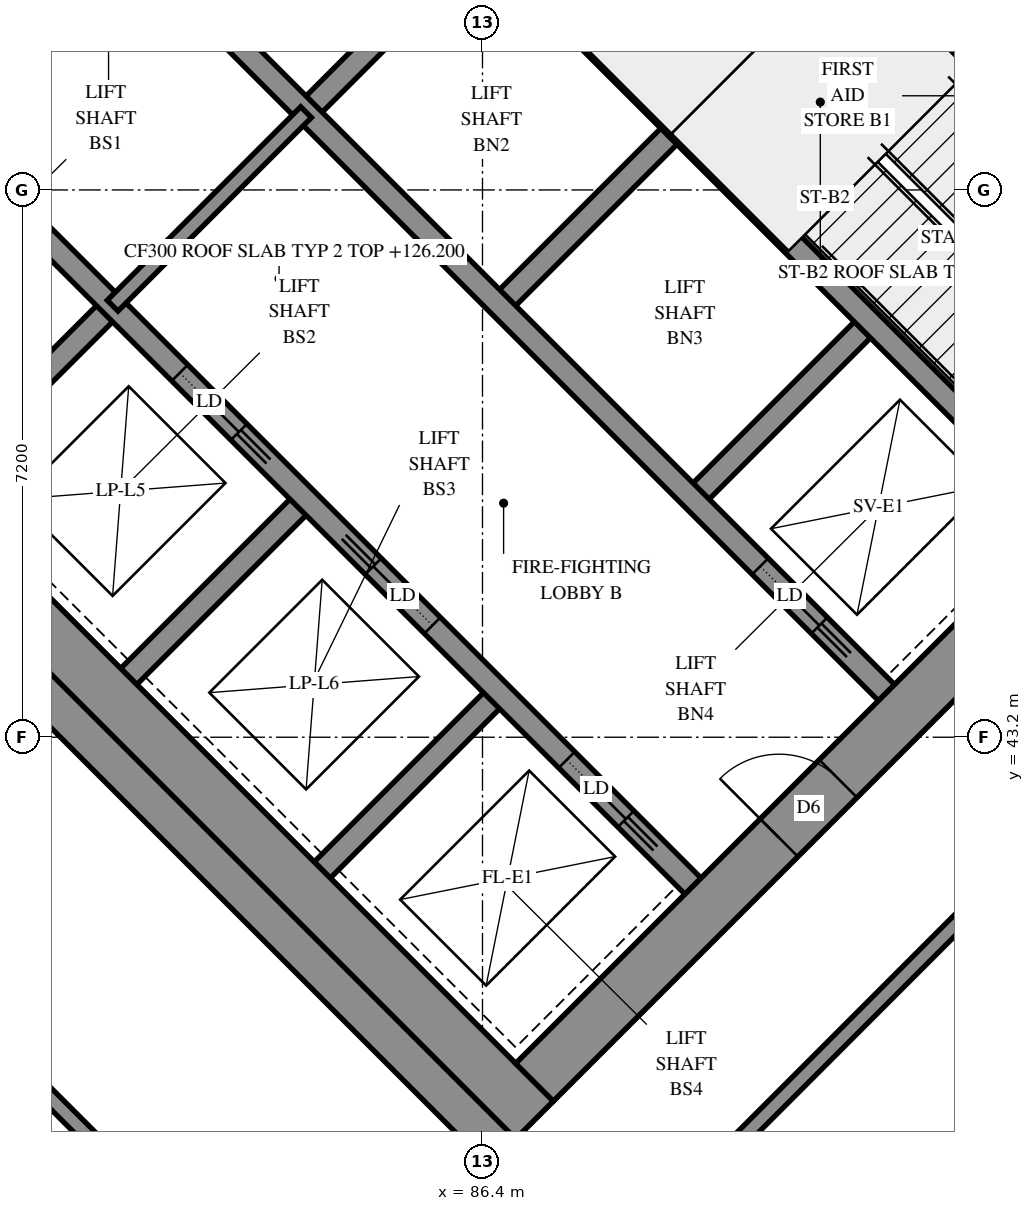
"""IFC4 building model, lengths in metres.
Left out: names, types, materials, properties, quantities, classifications, styles, units other than length and angle.
Written with IfcOpenShell. Run it as: python <this file> out.ifc"""

import sys

from ifc_helpers import new_model, si_unit, direction, frame, frame_2d, origin, place, context, subcontext, project, spatial, polyline, rectangle, outline, extrude, element, fill, save


model = new_model("IFC4")
c1 = context("Model", 3, precision=1e-05, world=origin(), true_north=direction((0.0, 1.0)))
c2 = subcontext(c1, "Body", "Model", "MODEL_VIEW")
j1 = project(units=[si_unit("LENGTHUNIT", "METRE"), si_unit("PLANEANGLEUNIT", "RADIAN")], contexts=[c1])
p1 = place(None, origin())
s1 = spatial("IfcSite", under=j1, at=p1, CompositionType="ELEMENT")
p2 = place(p1, origin())
s2 = spatial("IfcBuilding", under=s1, at=p2, CompositionType="ELEMENT")
p3 = place(p2, frame((0.0, 0.0, 126.2)))
s3 = spatial("IfcBuildingStorey", under=s2, at=p3, CompositionType="ELEMENT", Elevation=126.2)
p4 = place(p3, frame((75.912, 49.337, -0.3), z_axis=(0.0, 0.0, 1.0), x_axis=(0.7071036166, -0.7071099457, 0.0)))
e1 = element("IfcWall", 1, at=p4, inside=s3, PredefinedType="SHEAR", context=c2, shape_type="SweptSolid", body=[
    extrude(rectangle(XDim=15.8, YDim=0.7, at=frame_2d((7.9, 0.0))), origin(), (0.0, 0.0, 1.0), 4.3),
])
p5 = place(p3, frame((86.589, 60.014, -0.3), z_axis=(0.0, 0.0, 1.0), x_axis=(0.7071099457, -0.7071036166, 0.0)))
e2 = element("IfcWall", 2, at=p5, inside=s3, PredefinedType="SHEAR", context=c2, shape_type="SweptSolid", body=[
    extrude(rectangle(XDim=15.8, YDim=0.7, at=frame_2d((7.9, 0.0))), origin(), (0.0, 0.0, 1.0), 4.3),
])
p6 = place(p5, frame((10.7, 0.0, 0.3)))
e3 = element("IfcOpeningElement", 3, at=p6, cuts=e2, PredefinedType="OPENING", context=c2, shape_type="SweptSolid", body=[
    extrude(rectangle(XDim=0.8, YDim=2.1, at=frame_2d((0.4, 1.05))), frame((0.0, 0.36, 0.0), z_axis=(0.0, -1.0, 0.0), x_axis=(1.0, 0.0, 0.0)), (0.0, 0.0, 1.0), 0.72),
])
p7 = place(p3, frame((76.407, 49.337, -0.3), z_axis=(0.0, 0.0, 1.0), x_axis=(0.7071067812, 0.7071067812, 0.0)))
e4 = element("IfcWall", 4, at=p7, inside=s3, PredefinedType="SHEAR", context=c2, shape_type="SweptSolid", body=[
    extrude(rectangle(XDim=14.4, YDim=0.7, at=frame_2d((7.2, 0.0))), origin(), (0.0, 0.0, 1.0), 4.3),
])
p8 = place(p7, frame((4.55, 0.0, 0.3)))
e5 = element("IfcOpeningElement", 5, at=p8, cuts=e4, PredefinedType="OPENING", context=c2, shape_type="SweptSolid", body=[
    extrude(rectangle(XDim=1.1, YDim=2.1, at=frame_2d((0.55, 1.05))), frame((0.0, 0.36, 0.0), z_axis=(0.0, -1.0, 0.0), x_axis=(1.0, 0.0, 0.0)), (0.0, 0.0, 1.0), 0.72),
])
p9 = place(p7, frame((11.35, 0.0, 0.3)))
e6 = element("IfcOpeningElement", 6, at=p9, cuts=e4, PredefinedType="OPENING", context=c2, shape_type="SweptSolid", body=[
    extrude(rectangle(XDim=1.1, YDim=2.1, at=frame_2d((0.55, 1.05))), frame((0.0, 0.36, 0.0), z_axis=(0.0, -1.0, 0.0), x_axis=(1.0, 0.0, 0.0)), (0.0, 0.0, 1.0), 0.72),
])
p10 = place(p3, frame((87.084, 38.66, -0.3), z_axis=(0.0, 0.0, 1.0), x_axis=(0.7071067812, 0.7071067812, 0.0)))
e7 = element("IfcWall", 7, at=p10, inside=s3, PredefinedType="SHEAR", context=c2, shape_type="SweptSolid", body=[
    extrude(rectangle(XDim=14.4, YDim=0.7, at=frame_2d((7.2, 0.0))), origin(), (0.0, 0.0, 1.0), 4.3),
])
p11 = place(p10, frame((4.55, 0.0, 0.3)))
e8 = element("IfcOpeningElement", 8, at=p11, cuts=e7, PredefinedType="OPENING", context=c2, shape_type="SweptSolid", body=[
    extrude(rectangle(XDim=1.1, YDim=2.1, at=frame_2d((0.55, 1.05))), frame((0.0, 0.36, 0.0), z_axis=(0.0, -1.0, 0.0), x_axis=(1.0, 0.0, 0.0)), (0.0, 0.0, 1.0), 0.72),
])
p12 = place(p10, frame((11.35, 0.0, 0.3)))
e9 = element("IfcOpeningElement", 9, at=p12, cuts=e7, PredefinedType="OPENING", context=c2, shape_type="SweptSolid", body=[
    extrude(rectangle(XDim=1.1, YDim=2.1, at=frame_2d((0.55, 1.05))), frame((0.0, 0.36, 0.0), z_axis=(0.0, -1.0, 0.0), x_axis=(1.0, 0.0, 0.0)), (0.0, 0.0, 1.0), 0.72),
])
for number, where, z_axis, x_axis in (
    (10, (79.2, 46.544, 0.0), (0.0, 0.0, 1.0), (0.707, 0.707, 0.0)),
    (11, (84.079, 51.423, 0.0), (0.0, 0.0, 1.0), (0.707, 0.707, 0.0)),
):
    element("IfcWall", number, at=place(p3, frame(where, z_axis=z_axis, x_axis=x_axis)), inside=s3, PredefinedType="SOLIDWALL", context=c2, shape_type="SweptSolid", body=[
        extrude(rectangle(XDim=3.3, YDim=0.3, at=frame_2d((1.65, 0.0))), origin(), (0.0, 0.0, 1.0), 4.7),
    ])
p13 = place(p3, frame((81.746, 43.999, 0.0), z_axis=(0.0, 0.0, 1.0), x_axis=(0.7071067812, 0.7071067812, 0.0)))
e12 = element("IfcWall", 12, at=p13, inside=s3, PredefinedType="SOLIDWALL", context=c2, shape_type="SweptSolid", body=[
    extrude(rectangle(XDim=3.3, YDim=0.3, at=frame_2d((1.65, 0.0))), origin(), (0.0, 0.0, 1.0), 4.7),
])
p14 = place(p3, frame((86.625, 48.878, 0.0), z_axis=(0.0, 0.0, 1.0), x_axis=(0.7071067812, 0.7071067812, 0.0)))
e13 = element("IfcWall", 13, at=p14, inside=s3, PredefinedType="SOLIDWALL", context=c2, shape_type="SweptSolid", body=[
    extrude(rectangle(XDim=3.3, YDim=0.3, at=frame_2d((1.65, 0.0))), origin(), (0.0, 0.0, 1.0), 4.7),
])
p15 = place(p3, frame((84.291, 41.453, 0.0), z_axis=(0.0, 0.0, 1.0), x_axis=(0.7071067812, 0.7071067812, 0.0)))
e14 = element("IfcWall", 14, at=p15, inside=s3, PredefinedType="SOLIDWALL", context=c2, shape_type="SweptSolid", body=[
    extrude(rectangle(XDim=3.3, YDim=0.3, at=frame_2d((1.65, 0.0))), origin(), (0.0, 0.0, 1.0), 4.7),
])
p16 = place(p3, frame((89.17, 46.332, 0.0), z_axis=(0.0, 0.0, 1.0), x_axis=(0.7071067812, 0.7071067812, 0.0)))
e15 = element("IfcWall", 15, at=p16, inside=s3, PredefinedType="SOLIDWALL", context=c2, shape_type="SweptSolid", body=[
    extrude(rectangle(XDim=3.3, YDim=0.3, at=frame_2d((1.65, 0.0))), origin(), (0.0, 0.0, 1.0), 4.7),
])
p17 = place(p3, frame((78.988, 51.423, 0.0), z_axis=(0.0, 0.0, 1.0), x_axis=(0.7071067812, -0.7071067812, 0.0)))
e16 = element("IfcWall", 16, at=p17, inside=s3, PredefinedType="SOLIDWALL", context=c2, shape_type="SweptSolid", body=[
    extrude(rectangle(XDim=14.4, YDim=0.3, at=frame_2d((7.2, 0.0))), origin(), (0.0, 0.0, 1.0), 4.7),
])
p18 = place(p17, frame((1.25, 0.0, 0.0)))
e17 = element("IfcOpeningElement", 17, at=p18, cuts=e16, PredefinedType="OPENING", context=c2, shape_type="SweptSolid", body=[
    extrude(rectangle(XDim=1.1, YDim=2.1, at=frame_2d((0.55, 1.05))), frame((0.0, 0.16, 0.0), z_axis=(0.0, -1.0, 0.0), x_axis=(1.0, 0.0, 0.0)), (0.0, 0.0, 1.0), 0.32),
])
p19 = place(p17, frame((4.85, 0.0, 0.0)))
e18 = element("IfcOpeningElement", 18, at=p19, cuts=e16, PredefinedType="OPENING", context=c2, shape_type="SweptSolid", body=[
    extrude(rectangle(XDim=1.1, YDim=2.1, at=frame_2d((0.55, 1.05))), frame((0.0, 0.16, 0.0), z_axis=(0.0, -1.0, 0.0), x_axis=(1.0, 0.0, 0.0)), (0.0, 0.0, 1.0), 0.32),
])
p20 = place(p17, frame((8.45, 0.0, 0.0)))
e19 = element("IfcOpeningElement", 19, at=p20, cuts=e16, PredefinedType="OPENING", context=c2, shape_type="SweptSolid", body=[
    extrude(rectangle(XDim=1.1, YDim=2.1, at=frame_2d((0.55, 1.05))), frame((0.0, 0.16, 0.0), z_axis=(0.0, -1.0, 0.0), x_axis=(1.0, 0.0, 0.0)), (0.0, 0.0, 1.0), 0.32),
])
p21 = place(p17, frame((12.05, 0.0, 0.0)))
e20 = element("IfcOpeningElement", 20, at=p21, cuts=e16, PredefinedType="OPENING", context=c2, shape_type="SweptSolid", body=[
    extrude(rectangle(XDim=1.1, YDim=2.1, at=frame_2d((0.55, 1.05))), frame((0.0, 0.16, 0.0), z_axis=(0.0, -1.0, 0.0), x_axis=(1.0, 0.0, 0.0)), (0.0, 0.0, 1.0), 0.32),
])
p22 = place(p3, frame((81.534, 53.969, 0.0), z_axis=(0.0, 0.0, 1.0), x_axis=(0.707103309, -0.7071102534, 0.0)))
e21 = element("IfcWall", 21, at=p22, inside=s3, PredefinedType="SOLIDWALL", context=c2, shape_type="SweptSolid", body=[
    extrude(rectangle(XDim=14.4, YDim=0.3, at=frame_2d((7.2, 0.0))), origin(), (0.0, 0.0, 1.0), 4.7),
])
p23 = place(p22, frame((12.05, 0.0, 0.0)))
e22 = element("IfcOpeningElement", 22, at=p23, cuts=e21, PredefinedType="OPENING", context=c2, shape_type="SweptSolid", body=[
    extrude(rectangle(XDim=1.1, YDim=2.1, at=frame_2d((0.55, 1.05))), frame((0.0, 0.16, 0.0), z_axis=(0.0, -1.0, 0.0), x_axis=(1.0, 0.0, 0.0)), (0.0, 0.0, 1.0), 0.32),
])
for number, where, z_axis, x_axis in (
    (23, (83.867, 56.302, 0.0), (0.0, 0.0, 1.0), (0.707, -0.707, 0.0)),
    (24, (88.958, 51.211, 0.0), (0.0, 0.0, 1.0), (0.707, -0.707, 0.0)),
):
    element("IfcWall", number, at=place(p3, frame(where, z_axis=z_axis, x_axis=x_axis)), inside=s3, PredefinedType="SOLIDWALL", context=c2, shape_type="SweptSolid", body=[
        extrude(rectangle(XDim=7.2, YDim=0.3, at=frame_2d((3.6, 0.0))), origin(), (0.0, 0.0, 1.0), 4.7),
    ])
p24 = place(p3, frame((88.958, 51.211, 0.0), z_axis=(0.0, 0.0, 1.0), x_axis=(0.7071067812, 0.7071067812, 0.0)))
e25 = element("IfcWall", 25, at=p24, inside=s3, PredefinedType="SOLIDWALL", context=c2, shape_type="SweptSolid", body=[
    extrude(rectangle(XDim=4.2, YDim=0.3, at=frame_2d((2.1, 0.0))), origin(), (0.0, 0.0, 1.0), 4.7),
])
p25 = place(p3, frame((104.267, 43.15, 0.0), z_axis=(0.0, 0.0, 1.0), x_axis=(-0.7071054305, 0.7071081319, 0.0)))
e26 = element("IfcWall", 26, at=p25, inside=s3, PredefinedType="SOLIDWALL", context=c2, shape_type="SweptSolid", body=[
    extrude(outline(polyline([(-0.275, -0.275), (37.131, -0.275), (36.903, 0.275), (0.275, 0.275), (-0.275, -0.275)])), origin(), (0.0, 0.0, 1.0), 4.7),
])
p26 = place(p25, frame((3.325, 0.0, 0.9)))
e27 = element("IfcOpeningElement", 27, at=p26, cuts=e26, PredefinedType="OPENING", context=c2, shape_type="SweptSolid", body=[
    extrude(rectangle(XDim=1.8, YDim=2.4, at=frame_2d((0.9, 1.2))), frame((0.0, 0.285, 0.0), z_axis=(0.0, -1.0, 0.0), x_axis=(1.0, 0.0, 0.0)), (0.0, 0.0, 1.0), 0.57),
])
p27 = place(p25, frame((6.675, 0.0, 0.9)))
e28 = element("IfcOpeningElement", 28, at=p27, cuts=e26, PredefinedType="OPENING", context=c2, shape_type="SweptSolid", body=[
    extrude(rectangle(XDim=1.8, YDim=2.4, at=frame_2d((0.9, 1.2))), frame((0.0, 0.285, 0.0), z_axis=(0.0, -1.0, 0.0), x_axis=(1.0, 0.0, 0.0)), (0.0, 0.0, 1.0), 0.57),
])
p28 = place(p25, frame((24.625, 0.0, 0.9)))
e29 = element("IfcOpeningElement", 29, at=p28, cuts=e26, PredefinedType="OPENING", context=c2, shape_type="SweptSolid", body=[
    extrude(rectangle(XDim=1.8, YDim=2.4, at=frame_2d((0.9, 1.2))), frame((0.0, 0.285, 0.0), z_axis=(0.0, -1.0, 0.0), x_axis=(1.0, 0.0, 0.0)), (0.0, 0.0, 1.0), 0.57),
])
p29 = place(p25, frame((28.225, 0.0, 0.9)))
e30 = element("IfcOpeningElement", 30, at=p29, cuts=e26, PredefinedType="OPENING", context=c2, shape_type="SweptSolid", body=[
    extrude(rectangle(XDim=1.8, YDim=2.4, at=frame_2d((0.9, 1.2))), frame((0.0, 0.285, 0.0), z_axis=(0.0, -1.0, 0.0), x_axis=(1.0, 0.0, 0.0)), (0.0, 0.0, 1.0), 0.57),
])
p30 = place(p25, frame((31.825, 0.0, 0.9)))
e31 = element("IfcOpeningElement", 31, at=p30, cuts=e26, PredefinedType="OPENING", context=c2, shape_type="SweptSolid", body=[
    extrude(rectangle(XDim=1.8, YDim=2.4, at=frame_2d((0.9, 1.2))), frame((0.0, 0.285, 0.0), z_axis=(0.0, -1.0, 0.0), x_axis=(1.0, 0.0, 0.0)), (0.0, 0.0, 1.0), 0.57),
])
p31 = place(p25, frame((34.714, 0.0, 0.9)))
e32 = element("IfcOpeningElement", 32, at=p31, cuts=e26, PredefinedType="OPENING", context=c2, shape_type="SweptSolid", body=[
    extrude(rectangle(XDim=1.8, YDim=2.4, at=frame_2d((0.9, 1.2))), frame((0.0, 0.285, 0.0), z_axis=(0.0, -1.0, 0.0), x_axis=(1.0, 0.0, 0.0)), (0.0, 0.0, 1.0), 0.57),
])
p32 = place(p3, frame((78.561, 45.875, 0.0), z_axis=(0.0, 0.0, 1.0), x_axis=(0.7071067812, -0.7071067812, 0.0)))
e33 = element("IfcWall", 33, at=p32, inside=s3, PredefinedType="SOLIDWALL", context=c2, shape_type="SweptSolid", body=[
    extrude(outline(polyline([(0.114, -0.275), (22.779, -0.275), (22.229, 0.275), (-0.114, 0.275), (0.114, -0.275)])), origin(), (0.0, 0.0, 1.0), 4.7),
])
p33 = place(p32, frame((11.679, 0.0, 0.9)))
e34 = element("IfcOpeningElement", 34, at=p33, cuts=e33, PredefinedType="OPENING", context=c2, shape_type="SweptSolid", body=[
    extrude(rectangle(XDim=1.8, YDim=2.4, at=frame_2d((0.9, 1.2))), frame((0.0, 0.285, 0.0), z_axis=(0.0, -1.0, 0.0), x_axis=(1.0, 0.0, 0.0)), (0.0, 0.0, 1.0), 0.57),
])
p34 = place(p32, frame((15.279, 0.0, 0.9)))
e35 = element("IfcOpeningElement", 35, at=p34, cuts=e33, PredefinedType="OPENING", context=c2, shape_type="SweptSolid", body=[
    extrude(rectangle(XDim=1.8, YDim=2.4, at=frame_2d((0.9, 1.2))), frame((0.0, 0.285, 0.0), z_axis=(0.0, -1.0, 0.0), x_axis=(1.0, 0.0, 0.0)), (0.0, 0.0, 1.0), 0.57),
])
p35 = place(p32, frame((18.879, 0.0, 0.9)))
e36 = element("IfcOpeningElement", 36, at=p35, cuts=e33, PredefinedType="OPENING", context=c2, shape_type="SweptSolid", body=[
    extrude(rectangle(XDim=1.8, YDim=2.4, at=frame_2d((0.9, 1.2))), frame((0.0, 0.285, 0.0), z_axis=(0.0, -1.0, 0.0), x_axis=(1.0, 0.0, 0.0)), (0.0, 0.0, 1.0), 0.57),
])
p36 = place(p3, frame((107.838, 44.847, 0.0), z_axis=(0.0, 0.0, 1.0), x_axis=(-0.7071067812, 0.7071067812, 0.0)))
e37 = element("IfcWall", 37, at=p36, inside=s3, PredefinedType="SOLIDWALL", context=c2, shape_type="SweptSolid", body=[
    extrude(outline(polyline([(-0.1, -0.1), (39.926, -0.1), (39.843, 0.1), (0.1, 0.1), (-0.1, -0.1)])), origin(), (0.0, 0.0, 1.0), 4.7),
])
p37 = place(p3, frame((77.018, 42.15, 0.0), z_axis=(0.0, 0.0, 1.0), x_axis=(0.7071067812, -0.7071067812, 0.0)))
e38 = element("IfcWall", 38, at=p37, inside=s3, PredefinedType="SOLIDWALL", context=c2, shape_type="SweptSolid", body=[
    extrude(outline(polyline([(0.041, -0.1), (24.786, -0.1), (24.586, 0.1), (-0.041, 0.1), (0.041, -0.1)])), origin(), (0.0, 0.0, 1.0), 4.7),
])
p38 = place(p3, frame((91.313, 53.354, 0.0), z_axis=(0.0, 0.0, 1.0), x_axis=(0.7071067812, -0.7071067812, 0.0)))
e39 = element("IfcWall", 39, at=p38, inside=s3, PredefinedType="PARTITIONING", context=c2, shape_type="SweptSolid", body=[
    extrude(rectangle(XDim=5.95, YDim=0.15, at=frame_2d((2.975, 0.0))), origin(), (0.0, 0.0, 1.0), 4.7),
])
p39 = place(p3, frame((81.534, 48.878, 0.0), z_axis=(0.0, 0.0, 1.0), x_axis=(0.707092892, 0.7071206701, 0.0)))
e40 = element("IfcWall", 40, at=p39, inside=s3, PredefinedType="PARTITIONING", context=c2, shape_type="SweptSolid", body=[
    extrude(rectangle(XDim=3.6, YDim=0.2, at=frame_2d((1.8, 0.0))), origin(), (0.0, 0.0, 1.0), 4.7),
])
p40 = place(p3, frame((88.357, 36.468, 0.0), z_axis=(0.0, 0.0, 1.0), x_axis=(0.7069523276, 0.707261201, 0.0)))
e41 = element("IfcWall", 41, at=p40, inside=s3, PredefinedType="PARTITIONING", context=c2, shape_type="SweptSolid", body=[
    extrude(rectangle(XDim=6.799, YDim=0.2, at=frame_2d((3.399, 0.0))), origin(), (0.0, 0.0, 1.0), 4.7),
])
p41 = place(p11, origin())
e42 = element("IfcDoor", 42, at=p41, inside=s3, OperationType="DOUBLE_DOOR_SINGLE_SWING", PredefinedType="DOOR", context=c2, shape_type="SweptSolid", body=[
    extrude(rectangle(XDim=1.1, YDim=2.1, at=frame_2d((0.55, 1.05))), frame((0.0, 0.025, 0.0), z_axis=(0.0, -1.0, 0.0), x_axis=(1.0, 0.0, 0.0)), (0.0, 0.0, 1.0), 0.05),
])
fill(e8, e42)
p42 = place(p19, origin())
e43 = element("IfcDoor", 43, at=p42, inside=s3, OperationType="SLIDING_TO_RIGHT", PredefinedType="DOOR", context=c2, shape_type="SweptSolid", body=[
    extrude(rectangle(XDim=1.1, YDim=2.1, at=frame_2d((0.55, 1.05))), frame((0.0, 0.025, 0.0), z_axis=(0.0, -1.0, 0.0), x_axis=(1.0, 0.0, 0.0)), (0.0, 0.0, 1.0), 0.05),
])
fill(e18, e43)
p43 = place(p20, origin())
e44 = element("IfcDoor", 44, at=p43, inside=s3, OperationType="SLIDING_TO_LEFT", PredefinedType="DOOR", context=c2, shape_type="SweptSolid", body=[
    extrude(rectangle(XDim=1.1, YDim=2.1, at=frame_2d((0.55, 1.05))), frame((0.0, 0.025, 0.0), z_axis=(0.0, -1.0, 0.0), x_axis=(1.0, 0.0, 0.0)), (0.0, 0.0, 1.0), 0.05),
])
fill(e19, e44)
p44 = place(p21, origin())
e45 = element("IfcDoor", 45, at=p44, inside=s3, OperationType="SLIDING_TO_RIGHT", PredefinedType="DOOR", context=c2, shape_type="SweptSolid", body=[
    extrude(rectangle(XDim=1.1, YDim=2.1, at=frame_2d((0.55, 1.05))), frame((0.0, 0.025, 0.0), z_axis=(0.0, -1.0, 0.0), x_axis=(1.0, 0.0, 0.0)), (0.0, 0.0, 1.0), 0.05),
])
fill(e20, e45)
p45 = place(p23, origin())
e46 = element("IfcDoor", 46, at=p45, inside=s3, OperationType="SLIDING_TO_RIGHT", PredefinedType="DOOR", context=c2, shape_type="SweptSolid", body=[
    extrude(rectangle(XDim=1.1, YDim=2.1, at=frame_2d((0.55, 1.05))), frame((0.0, 0.025, 0.0), z_axis=(0.0, -1.0, 0.0), x_axis=(1.0, 0.0, 0.0)), (0.0, 0.0, 1.0), 0.05),
])
fill(e22, e46)
save(model, sys.argv[1])
